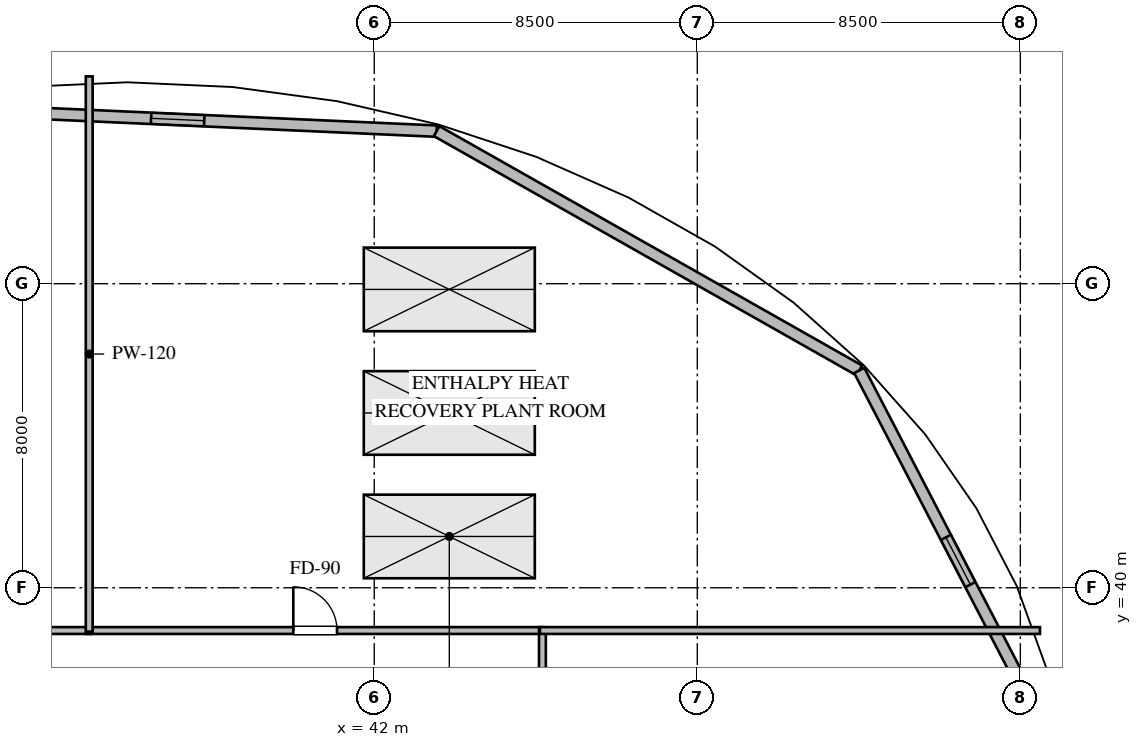
"""IFC4 building model, lengths in metres.
Left out: names, types, materials, properties, quantities, classifications, styles, units other than length and angle.
Written with IfcOpenShell. Run it as: python <this file> out.ifc"""

import sys

from ifc_helpers import new_model, si_unit, direction, frame, frame_2d, origin, place, context, subcontext, project, spatial, rectangle, extrude, element, fill, save


model = new_model("IFC4")
c1 = context("Model", 3, precision=1e-05, world=origin(), true_north=direction((0.0, 1.0)))
c2 = subcontext(c1, "Body", "Model", "MODEL_VIEW")
j1 = project(units=[si_unit("LENGTHUNIT", "METRE"), si_unit("PLANEANGLEUNIT", "RADIAN")], contexts=[c1])
p1 = place(None, origin())
s1 = spatial("IfcSite", under=j1, at=p1, CompositionType="ELEMENT")
p2 = place(p1, origin())
s2 = spatial("IfcBuilding", under=s1, at=p2, CompositionType="ELEMENT")
p3 = place(p2, frame((0.0, 0.0, 300.8)))
s3 = spatial("IfcBuildingStorey", under=s2, at=p3, CompositionType="ELEMENT", Elevation=300.8)
p4 = place(p3, frame((30.014, 52.626, 0.0), z_axis=(0.0, 0.0, 1.0), x_axis=(0.998996211569, -0.04479474602, 0.0)))
e1 = element("IfcWall", 1, at=p4, inside=s3, PredefinedType="STANDARD", context=c2, shape_type="SweptSolid", body=[
    extrude(rectangle(XDim=13.642, YDim=0.3, at=frame_2d((6.821, 0.0))), origin(), (0.0, 0.0, 1.0), 3.72),
])
p5 = place(p4, frame((6.121, 0.0, 1.2)))
e2 = element("IfcOpeningElement", 2, at=p5, cuts=e1, PredefinedType="OPENING", context=c2, shape_type="SweptSolid", body=[
    extrude(rectangle(XDim=1.4, YDim=1.2, at=frame_2d((0.7, 0.6))), frame((0.0, 0.16, 0.0), z_axis=(0.0, -1.0, 0.0), x_axis=(1.0, 0.0, 0.0)), (0.0, 0.0, 1.0), 0.32),
])
p6 = place(p3, frame((43.642, 52.015, 0.0), z_axis=(0.0, 0.0, 1.0), x_axis=(0.870169378253, -0.492752730232, 0.0)))
e3 = element("IfcWall", 3, at=p6, inside=s3, PredefinedType="STANDARD", context=c2, shape_type="SweptSolid", body=[
    extrude(rectangle(XDim=12.779, YDim=0.3, at=frame_2d((6.39, 0.0))), origin(), (0.0, 0.0, 1.0), 3.72),
])
p7 = place(p3, frame((54.762, 45.718, 0.0), z_axis=(0.0, 0.0, 1.0), x_axis=(0.460623742834, -0.8875954977, 0.0)))
e4 = element("IfcWall", 4, at=p7, inside=s3, PredefinedType="STANDARD", context=c2, shape_type="SweptSolid", body=[
    extrude(rectangle(XDim=11.296, YDim=0.3, at=frame_2d((5.648, 0.0))), origin(), (0.0, 0.0, 1.0), 3.72),
])
p8 = place(p7, frame((4.948, 0.0, 1.2)))
e5 = element("IfcOpeningElement", 5, at=p8, cuts=e4, PredefinedType="OPENING", context=c2, shape_type="SweptSolid", body=[
    extrude(rectangle(XDim=1.4, YDim=1.2, at=frame_2d((0.7, 0.6))), frame((0.0, 0.16, 0.0), z_axis=(0.0, -1.0, 0.0), x_axis=(1.0, 0.0, 0.0)), (0.0, 0.0, 1.0), 0.32),
])
p9 = place(p3, frame((21.745, 38.875, 0.0), z_axis=(0.0, 0.0, 1.0), x_axis=(1.0, 0.0, 0.0)))
e6 = element("IfcWall", 6, at=p9, inside=s3, PredefinedType="PARTITIONING", context=c2, shape_type="SweptSolid", body=[
    extrude(rectangle(XDim=12.82, YDim=0.18, at=frame_2d((6.41, 0.0))), origin(), (0.0, 0.0, 1.0), 3.72),
])
p10 = place(p9, frame((5.835, 0.0, 0.0)))
e7 = element("IfcOpeningElement", 7, at=p10, cuts=e6, PredefinedType="OPENING", context=c2, shape_type="SweptSolid", body=[
    extrude(rectangle(XDim=1.15, YDim=2.1, at=frame_2d((0.575, 1.05))), frame((0.0, 0.1, 0.0), z_axis=(0.0, -1.0, 0.0), x_axis=(1.0, 0.0, 0.0)), (0.0, 0.0, 1.0), 0.2),
])
p11 = place(p3, frame((34.435, 38.875, 0.0), z_axis=(0.0, 0.0, 1.0), x_axis=(1.0, 0.0, 0.0)))
e8 = element("IfcWall", 8, at=p11, inside=s3, PredefinedType="PARTITIONING", context=c2, shape_type="SweptSolid", body=[
    extrude(rectangle(XDim=12.02, YDim=0.18, at=frame_2d((6.01, 0.0))), origin(), (0.0, 0.0, 1.0), 3.72),
])
p12 = place(p11, frame((5.435, 0.0, 0.0)))
e9 = element("IfcOpeningElement", 9, at=p12, cuts=e8, PredefinedType="OPENING", context=c2, shape_type="SweptSolid", body=[
    extrude(rectangle(XDim=1.15, YDim=2.1, at=frame_2d((0.575, 1.05))), frame((0.0, 0.1, 0.0), z_axis=(0.0, -1.0, 0.0), x_axis=(1.0, 0.0, 0.0)), (0.0, 0.0, 1.0), 0.2),
])
p13 = place(p3, frame((46.425, 38.905, 0.0), z_axis=(0.0, 0.0, 1.0), x_axis=(0.0, -1.0, 0.0)))
e10 = element("IfcWall", 10, at=p13, inside=s3, PredefinedType="PARTITIONING", context=c2, shape_type="SweptSolid", body=[
    extrude(rectangle(XDim=15.56, YDim=0.18, at=frame_2d((7.78, 0.0))), origin(), (0.0, 0.0, 1.0), 3.72),
])
p14 = place(p13, frame((7.205, 0.0, 0.0)))
e11 = element("IfcOpeningElement", 11, at=p14, cuts=e10, PredefinedType="OPENING", context=c2, shape_type="SweptSolid", body=[
    extrude(rectangle(XDim=1.15, YDim=2.1, at=frame_2d((0.575, 1.05))), frame((0.0, 0.1, 0.0), z_axis=(0.0, -1.0, 0.0), x_axis=(1.0, 0.0, 0.0)), (0.0, 0.0, 1.0), 0.2),
])
p15 = place(p3, frame((34.5, 53.455, 0.0), z_axis=(0.0, 0.0, 1.0), x_axis=(0.0, -1.0, 0.0)))
e12 = element("IfcWall", 12, at=p15, inside=s3, PredefinedType="PARTITIONING", context=c2, shape_type="SweptSolid", body=[
    extrude(rectangle(XDim=14.61, YDim=0.18, at=frame_2d((7.305, 0.0))), origin(), (0.0, 0.0, 1.0), 3.72),
])
p16 = place(p3, frame((59.517, 38.875, 0.0), z_axis=(0.0, 0.0, 1.0), x_axis=(-1.0, 0.0, 0.0)))
e13 = element("IfcWall", 13, at=p16, inside=s3, PredefinedType="PARTITIONING", context=c2, shape_type="SweptSolid", body=[
    extrude(rectangle(XDim=13.157, YDim=0.18, at=frame_2d((6.579, 0.0))), origin(), (0.0, 0.0, 1.0), 3.72),
])
p17 = place(p5, origin())
e14 = element("IfcWindow", 14, at=p17, inside=s3, PartitioningType="SINGLE_PANEL", PredefinedType="WINDOW", context=c2, shape_type="SweptSolid", body=[
    extrude(rectangle(XDim=1.4, YDim=1.2, at=frame_2d((0.7, 0.6))), frame((0.0, 0.03, 0.0), z_axis=(0.0, -1.0, 0.0), x_axis=(1.0, 0.0, 0.0)), (0.0, 0.0, 1.0), 0.06),
])
fill(e2, e14)
p18 = place(p8, origin())
e15 = element("IfcWindow", 15, at=p18, inside=s3, PartitioningType="SINGLE_PANEL", PredefinedType="WINDOW", context=c2, shape_type="SweptSolid", body=[
    extrude(rectangle(XDim=1.4, YDim=1.2, at=frame_2d((0.7, 0.6))), frame((0.0, 0.03, 0.0), z_axis=(0.0, -1.0, 0.0), x_axis=(1.0, 0.0, 0.0)), (0.0, 0.0, 1.0), 0.06),
])
fill(e5, e15)
p19 = place(p12, origin())
e16 = element("IfcDoor", 16, at=p19, inside=s3, OperationType="SINGLE_SWING_LEFT", PredefinedType="DOOR", context=c2, shape_type="SweptSolid", body=[
    extrude(rectangle(XDim=1.15, YDim=2.1, at=frame_2d((0.575, 1.05))), frame((0.0, 0.025, 0.0), z_axis=(0.0, -1.0, 0.0), x_axis=(1.0, 0.0, 0.0)), (0.0, 0.0, 1.0), 0.05),
])
fill(e9, e16)
save(model, sys.argv[1])
